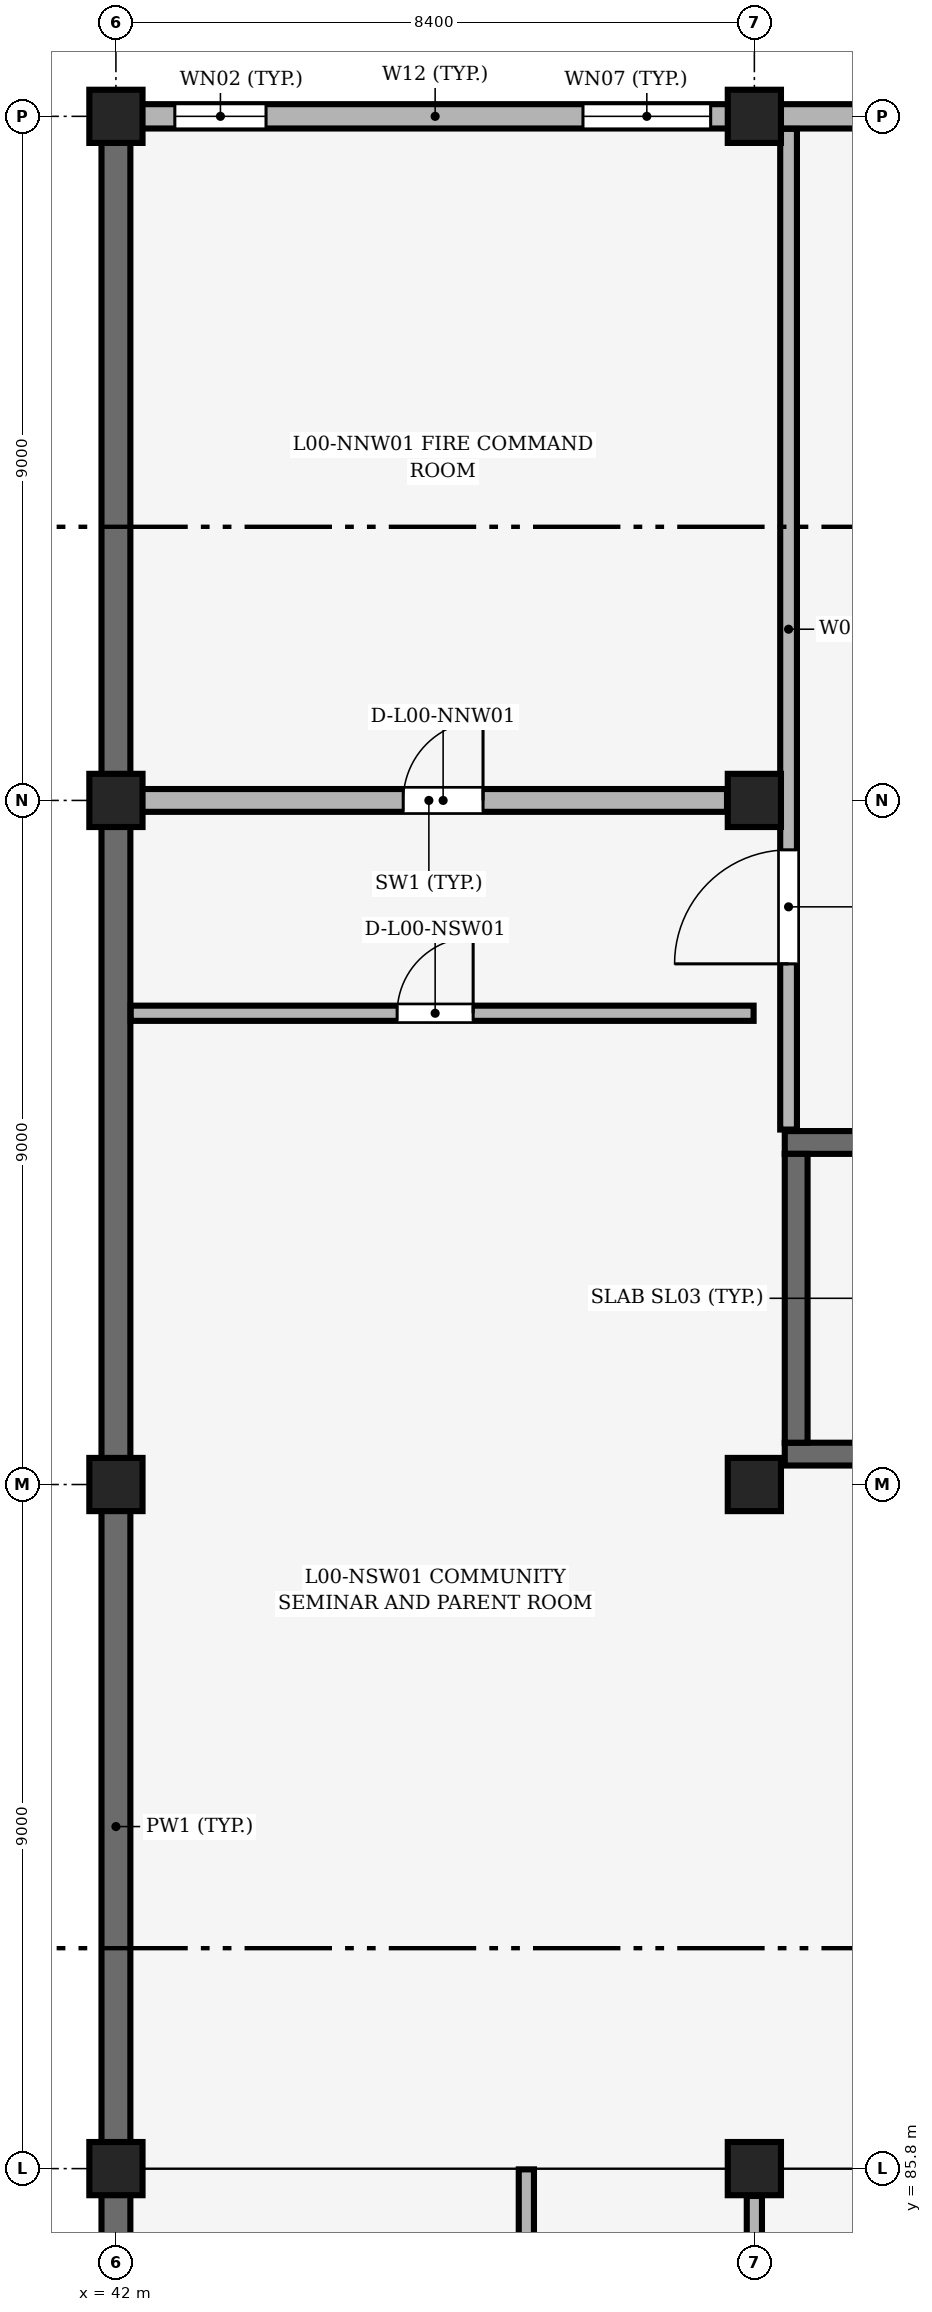
"""IFC4 building model, lengths in metres.
Left out: names, types, materials, properties, quantities, classifications, styles, units other than length and angle.
Written with IfcOpenShell. Run it as: python <this file> out.ifc"""

import sys

from ifc_helpers import new_model, si_unit, direction, frame, frame_2d, origin, origin_2d, place, context, subcontext, project, spatial, rectangle, extrude, element, fill, save


model = new_model("IFC4")
c1 = context("Model", 3, precision=1e-05, world=origin(), true_north=direction((0.0, 1.0)))
c2 = subcontext(c1, "Body", "Model", "MODEL_VIEW")
j1 = project(units=[si_unit("LENGTHUNIT", "METRE"), si_unit("PLANEANGLEUNIT", "RADIAN")], contexts=[c1])
p1 = place(None, origin())
s1 = spatial("IfcSite", under=j1, at=p1, CompositionType="ELEMENT")
p2 = place(p1, origin())
s2 = spatial("IfcBuilding", under=s1, at=p2, CompositionType="ELEMENT")
p3 = place(p2, origin())
s3 = spatial("IfcBuildingStorey", under=s2, at=p3, CompositionType="ELEMENT", Elevation=0.0)
for number, where, z_axis, x_axis in (
    (1, (42.0, 85.8, 0.0), (0.0, 0.0, 1.0), (1.0, 0.0, 0.0)),
    (2, (42.0, 94.8, 0.0), (0.0, 0.0, 1.0), (1.0, 0.0, 0.0)),
    (3, (42.0, 103.8, 0.0), (0.0, 0.0, 1.0), (1.0, 0.0, 0.0)),
    (4, (42.0, 112.8, 0.0), (0.0, 0.0, 1.0), (1.0, 0.0, 0.0)),
    (5, (50.4, 85.8, 0.0), (0.0, 0.0, 1.0), (1.0, 0.0, 0.0)),
    (6, (50.4, 94.8, 0.0), (0.0, 0.0, 1.0), (1.0, 0.0, 0.0)),
    (7, (50.4, 103.8, 0.0), (0.0, 0.0, 1.0), (1.0, 0.0, 0.0)),
    (8, (50.4, 112.8, 0.0), (0.0, 0.0, 1.0), (1.0, 0.0, 0.0)),
):
    element("IfcColumn", number, at=place(p3, frame(where, z_axis=z_axis, x_axis=x_axis)), inside=s3, PredefinedType="COLUMN", context=c2, shape_type="SweptSolid", body=[
        extrude(rectangle(XDim=0.7, YDim=0.7, at=origin_2d()), origin(), (0.0, 0.0, 1.0), 4.8),
    ])
p4 = place(p3, frame((42.325, 112.8, 0.0), z_axis=(0.0, 0.0, 1.0), x_axis=(1.0, 0.0, 0.0)))
e9 = element("IfcWall", 9, at=p4, inside=s3, PredefinedType="SOLIDWALL", context=c2, shape_type="SweptSolid", body=[
    extrude(rectangle(XDim=7.75, YDim=0.32, at=frame_2d((3.875, 0.0))), origin(), (0.0, 0.0, 1.0), 3.92),
])
p5 = place(p4, frame((0.45, 0.0, 0.9)))
e10 = element("IfcOpeningElement", 10, at=p5, cuts=e9, PredefinedType="OPENING", context=c2, shape_type="SweptSolid", body=[
    extrude(rectangle(XDim=1.2, YDim=1.8, at=frame_2d((0.6, 0.9))), frame((0.0, 0.17, 0.0), z_axis=(0.0, -1.0, 0.0), x_axis=(1.0, 0.0, 0.0)), (0.0, 0.0, 1.0), 0.34),
])
p6 = place(p4, frame((5.82, 0.0, 0.9)))
e11 = element("IfcOpeningElement", 11, at=p6, cuts=e9, PredefinedType="OPENING", context=c2, shape_type="SweptSolid", body=[
    extrude(rectangle(XDim=1.68, YDim=2.4, at=frame_2d((0.84, 1.2))), frame((0.0, 0.17, 0.0), z_axis=(0.0, -1.0, 0.0), x_axis=(1.0, 0.0, 0.0)), (0.0, 0.0, 1.0), 0.34),
])
p7 = place(p3, frame((50.725, 112.8, 0.0), z_axis=(0.0, 0.0, 1.0), x_axis=(1.0, 0.0, 0.0)))
e12 = element("IfcWall", 12, at=p7, inside=s3, PredefinedType="SOLIDWALL", context=c2, shape_type="SweptSolid", body=[
    extrude(rectangle(XDim=7.75, YDim=0.32, at=frame_2d((3.875, 0.0))), origin(), (0.0, 0.0, 1.0), 3.87),
])
p8 = place(p7, frame((1.125, 0.0, 0.0)))
e13 = element("IfcOpeningElement", 13, at=p8, cuts=e12, PredefinedType="OPENING", context=c2, shape_type="SweptSolid", body=[
    extrude(rectangle(XDim=1.65, YDim=2.25, at=frame_2d((0.825, 1.125))), frame((0.0, 0.17, 0.0), z_axis=(0.0, -1.0, 0.0), x_axis=(1.0, 0.0, 0.0)), (0.0, 0.0, 1.0), 0.34),
])
for number, where, z_axis, x_axis in (
    (14, (42.0, 86.125, 0.0), (0.0, 0.0, 1.0), (0.0, 1.0, 0.0)),
    (15, (42.0, 95.125, 0.0), (0.0, 0.0, 1.0), (0.0, 1.0, 0.0)),
    (16, (42.0, 104.125, 0.0), (0.0, 0.0, 1.0), (0.0, 1.0, 0.0)),
):
    element("IfcWall", number, at=place(p3, frame(where, z_axis=z_axis, x_axis=x_axis)), inside=s3, PredefinedType="SHEAR", context=c2, shape_type="SweptSolid", body=[
        extrude(rectangle(XDim=8.35, YDim=0.38, at=frame_2d((4.175, 0.0))), origin(), (0.0, 0.0, 1.0), 3.912),
    ])
p9 = place(p3, frame((42.0, 77.725, 0.0), z_axis=(0.0, 0.0, 1.0), x_axis=(0.0, 1.0, 0.0)))
e17 = element("IfcWall", 17, at=p9, inside=s3, PredefinedType="SHEAR", context=c2, shape_type="SweptSolid", body=[
    extrude(rectangle(XDim=7.75, YDim=0.38, at=frame_2d((3.875, 0.0))), origin(), (0.0, 0.0, 1.0), 3.952),
])
p10 = place(p3, frame((50.8, 95.2, 0.0), z_axis=(0.0, 0.0, 1.0), x_axis=(1.0, 0.0, 0.0)))
e18 = element("IfcWall", 18, at=p10, inside=s3, PredefinedType="SHEAR", context=c2, shape_type="SweptSolid", body=[
    extrude(rectangle(XDim=7.6, YDim=0.3, at=frame_2d((3.8, 0.0))), origin(), (0.0, 0.0, 1.0), 4.625),
])
p11 = place(p3, frame((50.8, 99.3, 0.0), z_axis=(0.0, 0.0, 1.0), x_axis=(1.0, 0.0, 0.0)))
e19 = element("IfcWall", 19, at=p11, inside=s3, PredefinedType="SHEAR", context=c2, shape_type="SweptSolid", body=[
    extrude(rectangle(XDim=7.6, YDim=0.3, at=frame_2d((3.8, 0.0))), origin(), (0.0, 0.0, 1.0), 4.625),
])
p12 = place(p11, frame((1.2, 0.0, 0.0)))
e20 = element("IfcOpeningElement", 20, at=p12, cuts=e19, PredefinedType="OPENING", context=c2, shape_type="SweptSolid", body=[
    extrude(rectangle(XDim=1.6, YDim=2.2, at=frame_2d((0.8, 1.1))), frame((0.0, 0.16, 0.0), z_axis=(0.0, -1.0, 0.0), x_axis=(1.0, 0.0, 0.0)), (0.0, 0.0, 1.0), 0.32),
])
p13 = place(p3, frame((50.95, 95.35, 0.0), z_axis=(0.0, 0.0, 1.0), x_axis=(0.0, 1.0, 0.0)))
e21 = element("IfcWall", 21, at=p13, inside=s3, PredefinedType="SHEAR", context=c2, shape_type="SweptSolid", body=[
    extrude(rectangle(XDim=3.8, YDim=0.3, at=frame_2d((1.9, 0.0))), origin(), (0.0, 0.0, 1.0), 4.625),
])
p14 = place(p3, frame((47.4, 18.165, 0.0), z_axis=(0.0, 0.0, 1.0), x_axis=(0.0, 1.0, 0.0)))
e22 = element("IfcWall", 22, at=p14, inside=s3, PredefinedType="PARTITIONING", context=c2, shape_type="SweptSolid", body=[
    extrude(rectangle(XDim=67.625, YDim=0.2, at=frame_2d((33.812, 0.0))), origin(), (0.0, 0.0, 1.0), 4.5),
])
p15 = place(p14, frame((2.535, 0.0, 0.0)))
e23 = element("IfcOpeningElement", 23, at=p15, cuts=e22, PredefinedType="OPENING", context=c2, shape_type="SweptSolid", body=[
    extrude(rectangle(XDim=1.0, YDim=2.25, at=frame_2d((0.5, 1.125))), frame((0.0, 0.11, 0.0), z_axis=(0.0, -1.0, 0.0), x_axis=(1.0, 0.0, 0.0)), (0.0, 0.0, 1.0), 0.22),
])
p16 = place(p14, frame((6.685, 0.0, 0.0)))
e24 = element("IfcOpeningElement", 24, at=p16, cuts=e22, PredefinedType="OPENING", context=c2, shape_type="SweptSolid", body=[
    extrude(rectangle(XDim=1.5, YDim=2.2, at=frame_2d((0.75, 1.1))), frame((0.0, 0.11, 0.0), z_axis=(0.0, -1.0, 0.0), x_axis=(1.0, 0.0, 0.0)), (0.0, 0.0, 1.0), 0.22),
])
p17 = place(p14, frame((12.535, 0.0, 0.0)))
e25 = element("IfcOpeningElement", 25, at=p17, cuts=e22, PredefinedType="OPENING", context=c2, shape_type="SweptSolid", body=[
    extrude(rectangle(XDim=1.0, YDim=2.15, at=frame_2d((0.5, 1.075))), frame((0.0, 0.11, 0.0), z_axis=(0.0, -1.0, 0.0), x_axis=(1.0, 0.0, 0.0)), (0.0, 0.0, 1.0), 0.22),
])
p18 = place(p14, frame((20.935, 0.0, 0.0)))
e26 = element("IfcOpeningElement", 26, at=p18, cuts=e22, PredefinedType="OPENING", context=c2, shape_type="SweptSolid", body=[
    extrude(rectangle(XDim=1.0, YDim=2.15, at=frame_2d((0.5, 1.075))), frame((0.0, 0.11, 0.0), z_axis=(0.0, -1.0, 0.0), x_axis=(1.0, 0.0, 0.0)), (0.0, 0.0, 1.0), 0.22),
])
p19 = place(p14, frame((29.36, 0.0, 0.0)))
e27 = element("IfcOpeningElement", 27, at=p19, cuts=e22, PredefinedType="OPENING", context=c2, shape_type="SweptSolid", body=[
    extrude(rectangle(XDim=0.95, YDim=2.2, at=frame_2d((0.475, 1.1))), frame((0.0, 0.11, 0.0), z_axis=(0.0, -1.0, 0.0), x_axis=(1.0, 0.0, 0.0)), (0.0, 0.0, 1.0), 0.22),
])
p20 = place(p14, frame((36.26, 0.0, 0.0)))
e28 = element("IfcOpeningElement", 28, at=p20, cuts=e22, PredefinedType="OPENING", context=c2, shape_type="SweptSolid", body=[
    extrude(rectangle(XDim=0.95, YDim=2.2, at=frame_2d((0.475, 1.1))), frame((0.0, 0.11, 0.0), z_axis=(0.0, -1.0, 0.0), x_axis=(1.0, 0.0, 0.0)), (0.0, 0.0, 1.0), 0.22),
])
p21 = place(p14, frame((41.06, 0.0, 0.0)))
e29 = element("IfcOpeningElement", 29, at=p21, cuts=e22, PredefinedType="OPENING", context=c2, shape_type="SweptSolid", body=[
    extrude(rectangle(XDim=0.95, YDim=2.1, at=frame_2d((0.475, 1.05))), frame((0.0, 0.11, 0.0), z_axis=(0.0, -1.0, 0.0), x_axis=(1.0, 0.0, 0.0)), (0.0, 0.0, 1.0), 0.22),
])
p22 = place(p14, frame((49.635, 0.0, 0.0)))
e30 = element("IfcOpeningElement", 30, at=p22, cuts=e22, PredefinedType="OPENING", context=c2, shape_type="SweptSolid", body=[
    extrude(rectangle(XDim=1.2, YDim=2.2, at=frame_2d((0.6, 1.1))), frame((0.0, 0.11, 0.0), z_axis=(0.0, -1.0, 0.0), x_axis=(1.0, 0.0, 0.0)), (0.0, 0.0, 1.0), 0.22),
])
p23 = place(p14, frame((61.735, 0.0, 0.0)))
e31 = element("IfcOpeningElement", 31, at=p23, cuts=e22, PredefinedType="OPENING", context=c2, shape_type="SweptSolid", body=[
    extrude(rectangle(XDim=1.0, YDim=2.25, at=frame_2d((0.5, 1.125))), frame((0.0, 0.11, 0.0), z_axis=(0.0, -1.0, 0.0), x_axis=(1.0, 0.0, 0.0)), (0.0, 0.0, 1.0), 0.22),
])
p24 = place(p3, frame((50.4, 77.76, 0.0), z_axis=(0.0, 0.0, 1.0), x_axis=(0.0, 1.0, 0.0)))
e32 = element("IfcWall", 32, at=p24, inside=s3, PredefinedType="PARTITIONING", context=c2, shape_type="SweptSolid", body=[
    extrude(rectangle(XDim=7.68, YDim=0.2, at=frame_2d((3.84, 0.0))), origin(), (0.0, 0.0, 1.0), 3.76),
])
p25 = place(p24, frame((3.79, 0.0, 0.0)))
e33 = element("IfcOpeningElement", 33, at=p25, cuts=e32, PredefinedType="OPENING", context=c2, shape_type="SweptSolid", body=[
    extrude(rectangle(XDim=0.9, YDim=2.1, at=frame_2d((0.45, 1.05))), frame((0.0, 0.11, 0.0), z_axis=(0.0, -1.0, 0.0), x_axis=(1.0, 0.0, 0.0)), (0.0, 0.0, 1.0), 0.22),
])
p26 = place(p3, frame((50.85, 99.47, 0.0), z_axis=(0.0, 0.0, 1.0), x_axis=(0.0, 1.0, 0.0)))
e34 = element("IfcWall", 34, at=p26, inside=s3, PredefinedType="SOLIDWALL", context=c2, shape_type="SweptSolid", body=[
    extrude(rectangle(XDim=13.165, YDim=0.22, at=frame_2d((6.583, 0.0))), origin(), (0.0, 0.0, 1.0), 4.5),
])
p27 = place(p26, frame((2.18, 0.0, 0.0)))
e35 = element("IfcOpeningElement", 35, at=p27, cuts=e34, PredefinedType="OPENING", context=c2, shape_type="SweptSolid", body=[
    extrude(rectangle(XDim=1.5, YDim=2.2, at=frame_2d((0.75, 1.1))), frame((0.0, 0.12, 0.0), z_axis=(0.0, -1.0, 0.0), x_axis=(1.0, 0.0, 0.0)), (0.0, 0.0, 1.0), 0.24),
])
p28 = place(p3, frame((42.195, 103.8, 0.0), z_axis=(0.0, 0.0, 1.0), x_axis=(1.0, 0.0, 0.0)))
e36 = element("IfcWall", 36, at=p28, inside=s3, PredefinedType="SHEAR", context=c2, shape_type="SweptSolid", body=[
    extrude(rectangle(XDim=7.845, YDim=0.3, at=frame_2d((3.922, 0.0))), origin(), (0.0, 0.0, 1.0), 3.67),
])
p29 = place(p28, frame((3.585, 0.0, 0.0)))
e37 = element("IfcOpeningElement", 37, at=p29, cuts=e36, PredefinedType="OPENING", context=c2, shape_type="SweptSolid", body=[
    extrude(rectangle(XDim=1.05, YDim=2.1, at=frame_2d((0.525, 1.05))), frame((0.0, 0.16, 0.0), z_axis=(0.0, -1.0, 0.0), x_axis=(1.0, 0.0, 0.0)), (0.0, 0.0, 1.0), 0.32),
])
p30 = place(p3, frame((42.195, 101.0, 0.0), z_axis=(0.0, 0.0, 1.0), x_axis=(1.0, 0.0, 0.0)))
e38 = element("IfcWall", 38, at=p30, inside=s3, PredefinedType="PARTITIONING", context=c2, shape_type="SweptSolid", body=[
    extrude(rectangle(XDim=8.195, YDim=0.2, at=frame_2d((4.097, 0.0))), origin(), (0.0, 0.0, 1.0), 4.07),
])
p31 = place(p30, frame((3.505, 0.0, 0.0)))
e39 = element("IfcOpeningElement", 39, at=p31, cuts=e38, PredefinedType="OPENING", context=c2, shape_type="SweptSolid", body=[
    extrude(rectangle(XDim=1.0, YDim=2.25, at=frame_2d((0.5, 1.125))), frame((0.0, 0.11, 0.0), z_axis=(0.0, -1.0, 0.0), x_axis=(1.0, 0.0, 0.0)), (0.0, 0.0, 1.0), 0.22),
])
p32 = place(p5, origin())
e40 = element("IfcWindow", 40, at=p32, inside=s3, PartitioningType="SINGLE_PANEL", PredefinedType="WINDOW", context=c2, shape_type="SweptSolid", body=[
    extrude(rectangle(XDim=1.2, YDim=1.8, at=frame_2d((0.6, 0.9))), frame((0.0, 0.03, 0.0), z_axis=(0.0, -1.0, 0.0), x_axis=(1.0, 0.0, 0.0)), (0.0, 0.0, 1.0), 0.06),
])
fill(e10, e40)
p33 = place(p6, origin())
e41 = element("IfcWindow", 41, at=p33, inside=s3, PartitioningType="SINGLE_PANEL", PredefinedType="WINDOW", context=c2, shape_type="SweptSolid", body=[
    extrude(rectangle(XDim=1.68, YDim=2.4, at=frame_2d((0.84, 1.2))), frame((0.0, 0.03, 0.0), z_axis=(0.0, -1.0, 0.0), x_axis=(1.0, 0.0, 0.0)), (0.0, 0.0, 1.0), 0.06),
])
fill(e11, e41)
p34 = place(p27, origin())
e42 = element("IfcDoor", 42, at=p34, inside=s3, OperationType="DOUBLE_DOOR_SINGLE_SWING", PredefinedType="DOOR", context=c2, shape_type="SweptSolid", body=[
    extrude(rectangle(XDim=1.5, YDim=2.2, at=frame_2d((0.75, 1.1))), frame((0.0, 0.025, 0.0), z_axis=(0.0, -1.0, 0.0), x_axis=(1.0, 0.0, 0.0)), (0.0, 0.0, 1.0), 0.05),
])
fill(e35, e42)
p35 = place(p29, origin())
e43 = element("IfcDoor", 43, at=p35, inside=s3, OperationType="SINGLE_SWING_RIGHT", PredefinedType="DOOR", context=c2, shape_type="SweptSolid", body=[
    extrude(rectangle(XDim=1.05, YDim=2.1, at=frame_2d((0.525, 1.05))), frame((0.0, 0.025, 0.0), z_axis=(0.0, -1.0, 0.0), x_axis=(1.0, 0.0, 0.0)), (0.0, 0.0, 1.0), 0.05),
])
fill(e37, e43)
p36 = place(p31, origin())
e44 = element("IfcDoor", 44, at=p36, inside=s3, OperationType="SINGLE_SWING_RIGHT", PredefinedType="DOOR", context=c2, shape_type="SweptSolid", body=[
    extrude(rectangle(XDim=1.0, YDim=2.25, at=frame_2d((0.5, 1.125))), frame((0.0, 0.025, 0.0), z_axis=(0.0, -1.0, 0.0), x_axis=(1.0, 0.0, 0.0)), (0.0, 0.0, 1.0), 0.05),
])
fill(e39, e44)
save(model, sys.argv[1])
